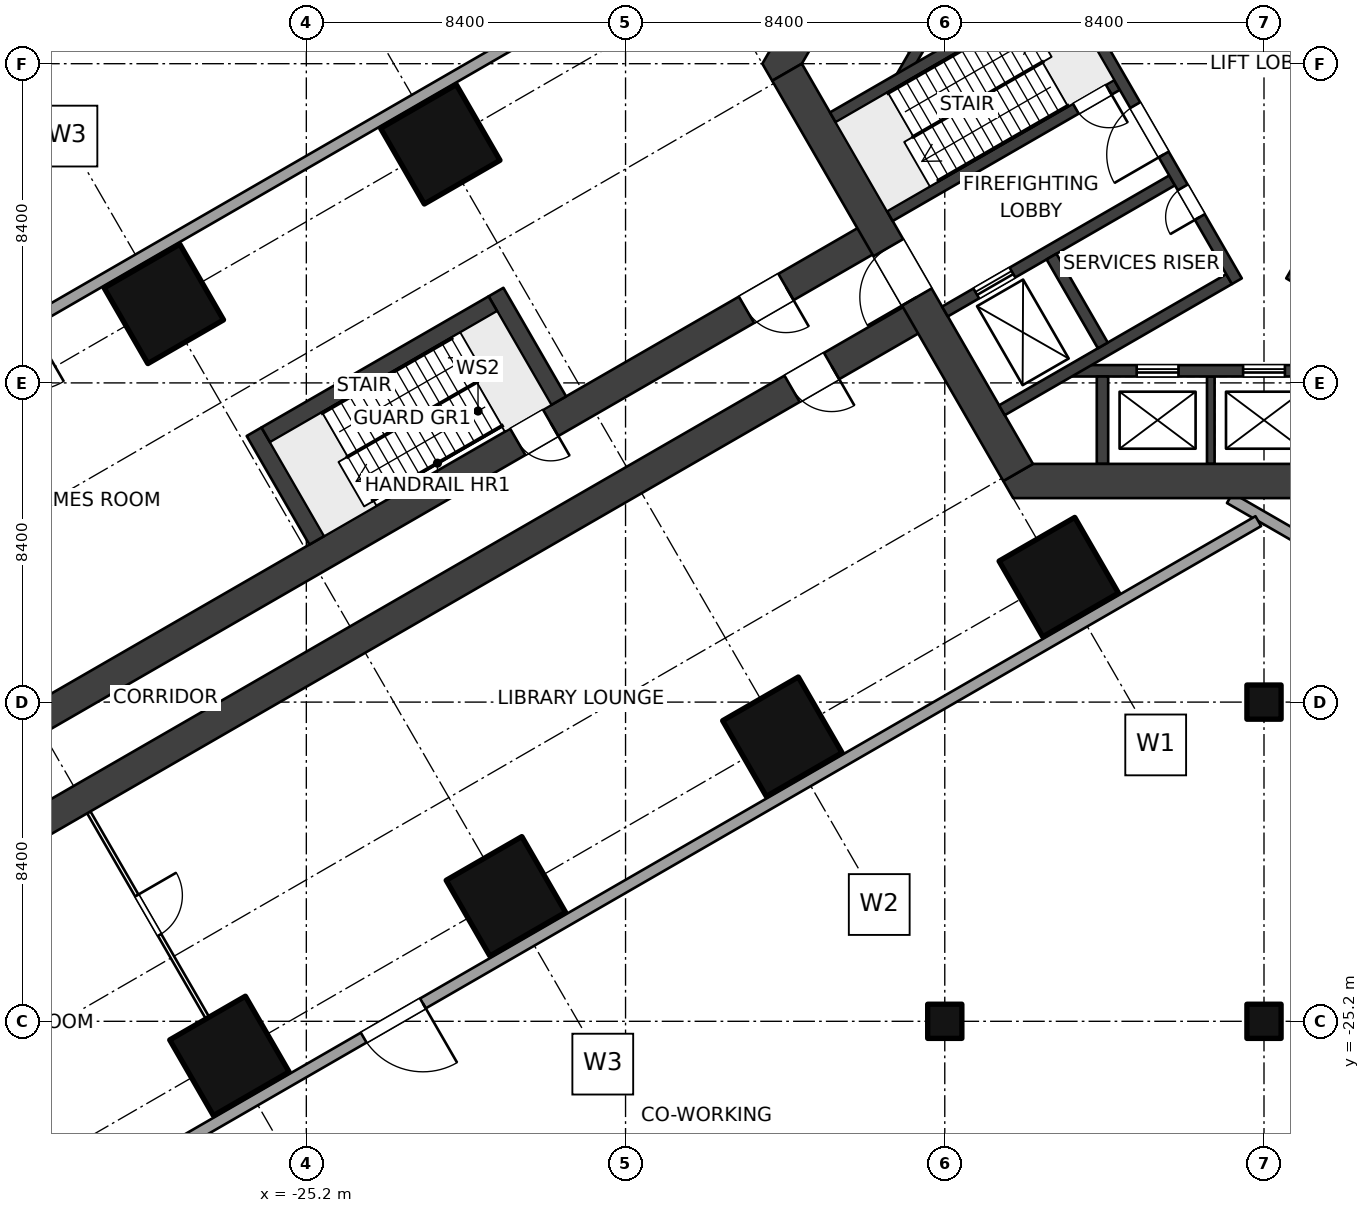
"""IFC4 building model, lengths in metres.
Left out: names, types, materials, properties, quantities, classifications, styles, units other than length and angle.
Written with IfcOpenShell. Run it as: python <this file> out.ifc"""

import sys

from ifc_helpers import new_model, si_unit, direction, frame, frame_2d, origin, origin_2d, place, context, subcontext, project, spatial, polyline, rectangle, outline, extrude, element, fill, save


model = new_model("IFC4")
c1 = context("Model", 3, precision=1e-05, world=origin(), true_north=direction((0.0, 1.0)))
c2 = subcontext(c1, "Body", "Model", "MODEL_VIEW")
j1 = project(units=[si_unit("LENGTHUNIT", "METRE"), si_unit("PLANEANGLEUNIT", "RADIAN")], contexts=[c1])
p1 = place(None, origin())
s1 = spatial("IfcSite", under=j1, at=p1, CompositionType="ELEMENT")
p2 = place(p1, origin())
s2 = spatial("IfcBuilding", under=s1, at=p2, CompositionType="ELEMENT")
p3 = place(p2, frame((0.0, 0.0, 6.0)))
s3 = spatial("IfcBuildingStorey", under=s2, at=p3, CompositionType="ELEMENT", Elevation=6.0)
for number, where, z_axis, x_axis in (
    (1, (-5.4, -13.51, 0.0), (0.0, 0.0, 1.0), (-0.5, 0.866, 0.0)),
    (2, (-12.675, -17.71, 0.0), (0.0, 0.0, 1.0), (-0.5, 0.866, 0.0)),
    (3, (-21.675, -2.122, 0.0), (0.0, 0.0, 1.0), (-0.5, 0.866, 0.0)),
    (4, (-19.949, -21.91, 0.0), (0.0, 0.0, 1.0), (-0.5, 0.866, 0.0)),
    (5, (-28.949, -6.322, 0.0), (0.0, 0.0, 1.0), (-0.5, 0.866, 0.0)),
    (6, (-27.224, -26.11, 0.0), (0.0, 0.0, 1.0), (-0.5, 0.866, 0.0)),
):
    element("IfcColumn", number, at=place(p3, frame(where, z_axis=z_axis, x_axis=x_axis)), inside=s3, PredefinedType="COLUMN", context=c2, shape_type="SweptSolid", body=[
        extrude(rectangle(XDim=2.3, YDim=2.3, at=origin_2d()), origin(), (0.0, 0.0, 1.0), 5.0),
    ])
for number, where, z_axis, x_axis in (
    (7, (-8.4, -25.2, 0.0), (0.0, 0.0, 1.0), (1.0, 0.0, 0.0)),
    (8, (0.0, -25.2, 0.0), (0.0, 0.0, 1.0), (1.0, 0.0, 0.0)),
    (9, (0.0, -16.8, 0.0), (0.0, 0.0, 1.0), (1.0, 0.0, 0.0)),
):
    element("IfcColumn", number, at=place(p3, frame(where, z_axis=z_axis, x_axis=x_axis)), inside=s3, PredefinedType="COLUMN", context=c2, shape_type="SweptSolid", body=[
        extrude(rectangle(XDim=0.9, YDim=0.9, at=origin_2d()), origin(), (0.0, 0.0, 1.0), 5.0),
    ])
p4 = place(p3, frame((-6.47, -10.757, 0.0), z_axis=(0.0, 0.0, 1.0), x_axis=(-0.499997612506, 0.8660267822, 0.0)))
e10 = element("IfcWall", 10, at=p4, inside=s3, PredefinedType="SHEAR", context=c2, shape_type="SweptSolid", body=[
    extrude(rectangle(XDim=12.161, YDim=0.9, at=frame_2d((6.08, 0.0))), origin(), (0.0, 0.0, 1.0), 5.0),
])
p5 = place(p4, frame((5.33, 0.0, 0.0)))
e11 = element("IfcOpeningElement", 11, at=p5, cuts=e10, PredefinedType="OPENING", context=c2, shape_type="SweptSolid", body=[
    extrude(rectangle(XDim=1.5, YDim=2.1, at=frame_2d((0.75, 1.05))), frame((0.0, 0.46, 0.0), z_axis=(0.0, -1.0, 0.0), x_axis=(1.0, 0.0, 0.0)), (0.0, 0.0, 1.0), 0.92),
])
p6 = place(p3, origin())
e12 = element("IfcWall", 12, at=p6, inside=s3, PredefinedType="SHEAR", context=c2, shape_type="SweptSolid", body=[
    extrude(outline(polyline([(-6.6, -11.432), (6.6, -11.432), (6.86, -10.981), (6.08, -10.531), (-6.08, -10.531), (-6.86, -10.981), (-6.6, -11.432)])), origin(), (0.0, 0.0, 1.0), 5.0),
])
p7 = place(p3, origin())
e13 = element("IfcWall", 13, at=p7, inside=s3, PredefinedType="SHEAR", context=c2, shape_type="SweptSolid", body=[
    extrude(outline(polyline([(-6.6, 11.432), (-13.2, 0.0), (-12.94, -0.45), (-12.161, 0.0), (-6.08, 10.531), (-6.08, 11.432), (-6.6, 11.432)])), origin(), (0.0, 0.0, 1.0), 5.0),
])
p8 = place(p3, frame((-0.714, -5.724, 0.0), z_axis=(0.0, 0.0, 1.0), x_axis=(-0.499995050369, 0.866028261437, 0.0)))
e14 = element("IfcWall", 14, at=p8, inside=s3, PredefinedType="SHEAR", context=c2, shape_type="SweptSolid", body=[
    extrude(rectangle(XDim=9.2, YDim=0.3, at=frame_2d((4.6, 0.0))), origin(), (0.0, 0.0, 1.0), 5.0),
])
p9 = place(p8, frame((3.85, 0.0, 0.0)))
e15 = element("IfcOpeningElement", 15, at=p9, cuts=e14, PredefinedType="OPENING", context=c2, shape_type="SweptSolid", body=[
    extrude(rectangle(XDim=1.5, YDim=2.1, at=frame_2d((0.75, 1.05))), frame((0.0, 0.16, 0.0), z_axis=(0.0, -1.0, 0.0), x_axis=(1.0, 0.0, 0.0)), (0.0, 0.0, 1.0), 0.32),
])
p10 = place(p8, frame((1.95, 0.0, 0.0)))
e16 = element("IfcOpeningElement", 16, at=p10, cuts=e14, PredefinedType="OPENING", context=c2, shape_type="SweptSolid", body=[
    extrude(rectangle(XDim=0.9, YDim=2.1, at=frame_2d((0.45, 1.05))), frame((0.0, 0.16, 0.0), z_axis=(0.0, -1.0, 0.0), x_axis=(1.0, 0.0, 0.0)), (0.0, 0.0, 1.0), 0.32),
])
p11 = place(p3, frame((-3.869, -0.559, 0.0), z_axis=(0.0, 0.0, 1.0), x_axis=(-0.86602711848, -0.499997030048, 0.0)))
e17 = element("IfcWall", 17, at=p11, inside=s3, PredefinedType="SHEAR", context=c2, shape_type="SweptSolid", body=[
    extrude(rectangle(XDim=6.901, YDim=0.3, at=frame_2d((3.451, 0.0))), origin(), (0.0, 0.0, 1.0), 5.0),
])
p12 = place(p11, frame((0.25, 0.0, 0.0)))
e18 = element("IfcOpeningElement", 18, at=p12, cuts=e17, PredefinedType="OPENING", context=c2, shape_type="SweptSolid", body=[
    extrude(rectangle(XDim=1.0, YDim=2.1, at=frame_2d((0.5, 1.05))), frame((0.0, 0.16, 0.0), z_axis=(0.0, -1.0, 0.0), x_axis=(1.0, 0.0, 0.0)), (0.0, 0.0, 1.0), 0.32),
])
p13 = place(p3, frame((-5.369, 2.039, 0.0), z_axis=(0.0, 0.0, 1.0), x_axis=(-0.86602711848, -0.499997030048, 0.0)))
e19 = element("IfcWall", 19, at=p13, inside=s3, PredefinedType="SHEAR", context=c2, shape_type="SweptSolid", body=[
    extrude(rectangle(XDim=6.901, YDim=0.3, at=frame_2d((3.451, 0.0))), origin(), (0.0, 0.0, 1.0), 5.0),
])
p14 = place(p3, frame((-2.419, -3.071, 0.0), z_axis=(0.0, 0.0, 1.0), x_axis=(-0.86602711848, -0.499997030048, 0.0)))
e20 = element("IfcWall", 20, at=p14, inside=s3, PredefinedType="SHEAR", context=c2, shape_type="SweptSolid", body=[
    extrude(rectangle(XDim=6.901, YDim=0.3, at=frame_2d((3.451, 0.0))), origin(), (0.0, 0.0, 1.0), 5.0),
])
p15 = place(p14, frame((4.85, 0.0, 0.0)))
e21 = element("IfcOpeningElement", 21, at=p15, cuts=e20, PredefinedType="OPENING", context=c2, shape_type="SweptSolid", body=[
    extrude(rectangle(XDim=1.1, YDim=2.1, at=frame_2d((0.55, 1.05))), frame((0.0, 0.16, 0.0), z_axis=(0.0, -1.0, 0.0), x_axis=(1.0, 0.0, 0.0)), (0.0, 0.0, 1.0), 0.32),
])
p16 = place(p3, frame((-0.919, -5.669, 0.0), z_axis=(0.0, 0.0, 1.0), x_axis=(-0.866011800373, -0.500023561059, 0.0)))
e22 = element("IfcWall", 22, at=p16, inside=s3, PredefinedType="SHEAR", context=c2, shape_type="SweptSolid", body=[
    extrude(rectangle(XDim=6.902, YDim=0.3, at=frame_2d((3.451, 0.0))), origin(), (0.0, 0.0, 1.0), 5.0),
])
p17 = place(p3, frame((-4.241, -7.414, 0.0), z_axis=(0.0, 0.0, 1.0), x_axis=(-0.500048589285, 0.86599734893, 0.0)))
e23 = element("IfcWall", 23, at=p17, inside=s3, PredefinedType="SHEAR", context=c2, shape_type="SweptSolid", body=[
    extrude(rectangle(XDim=2.7, YDim=0.3, at=frame_2d((1.35, 0.0))), origin(), (0.0, 0.0, 1.0), 5.0),
])
p18 = place(p3, frame((5.314, 2.244, 0.0), z_axis=(0.0, 0.0, 1.0), x_axis=(-0.499995050369, -0.866028261437, 0.0)))
e24 = element("IfcWall", 24, at=p18, inside=s3, PredefinedType="SHEAR", context=c2, shape_type="SweptSolid", body=[
    extrude(rectangle(XDim=9.2, YDim=0.3, at=frame_2d((4.6, 0.0))), origin(), (0.0, 0.0, 1.0), 5.0),
])
p19 = place(p18, frame((3.85, 0.0, 0.0)))
e25 = element("IfcOpeningElement", 25, at=p19, cuts=e24, PredefinedType="OPENING", context=c2, shape_type="SweptSolid", body=[
    extrude(rectangle(XDim=1.5, YDim=2.1, at=frame_2d((0.75, 1.05))), frame((0.0, 0.16, 0.0), z_axis=(0.0, -1.0, 0.0), x_axis=(1.0, 0.0, 0.0)), (0.0, 0.0, 1.0), 0.32),
])
p20 = place(p18, frame((1.95, 0.0, 0.0)))
e26 = element("IfcOpeningElement", 26, at=p20, cuts=e24, PredefinedType="OPENING", context=c2, shape_type="SweptSolid", body=[
    extrude(rectangle(XDim=0.9, YDim=2.1, at=frame_2d((0.45, 1.05))), frame((0.0, 0.16, 0.0), z_axis=(0.0, -1.0, 0.0), x_axis=(1.0, 0.0, 0.0)), (0.0, 0.0, 1.0), 0.32),
])
p21 = place(p3, frame((5.098, -8.082, 0.0), z_axis=(0.0, 0.0, 1.0), x_axis=(-1.0, 0.0, 0.0)))
e27 = element("IfcWall", 27, at=p21, inside=s3, PredefinedType="SHEAR", context=c2, shape_type="SweptSolid", body=[
    extrude(rectangle(XDim=10.195, YDim=0.3, at=frame_2d((5.098, 0.0))), origin(), (0.0, 0.0, 1.0), 5.0),
])
p22 = place(p21, frame((1.748, 0.0, 0.0)))
e28 = element("IfcOpeningElement", 28, at=p22, cuts=e27, PredefinedType="OPENING", context=c2, shape_type="SweptSolid", body=[
    extrude(rectangle(XDim=1.1, YDim=2.1, at=frame_2d((0.55, 1.05))), frame((0.0, 0.16, 0.0), z_axis=(0.0, -1.0, 0.0), x_axis=(1.0, 0.0, 0.0)), (0.0, 0.0, 1.0), 0.32),
])
p23 = place(p21, frame((4.548, 0.0, 0.0)))
e29 = element("IfcOpeningElement", 29, at=p23, cuts=e27, PredefinedType="OPENING", context=c2, shape_type="SweptSolid", body=[
    extrude(rectangle(XDim=1.1, YDim=2.1, at=frame_2d((0.55, 1.05))), frame((0.0, 0.16, 0.0), z_axis=(0.0, -1.0, 0.0), x_axis=(1.0, 0.0, 0.0)), (0.0, 0.0, 1.0), 0.32),
])
p24 = place(p21, frame((7.348, 0.0, 0.0)))
e30 = element("IfcOpeningElement", 30, at=p24, cuts=e27, PredefinedType="OPENING", context=c2, shape_type="SweptSolid", body=[
    extrude(rectangle(XDim=1.1, YDim=2.1, at=frame_2d((0.55, 1.05))), frame((0.0, 0.16, 0.0), z_axis=(0.0, -1.0, 0.0), x_axis=(1.0, 0.0, 0.0)), (0.0, 0.0, 1.0), 0.32),
])
p25 = place(p3, frame((-4.25, -8.231, 0.0), z_axis=(0.0, 0.0, 1.0), x_axis=(0.0, -1.0, 0.0)))
e31 = element("IfcWall", 31, at=p25, inside=s3, PredefinedType="SHEAR", context=c2, shape_type="SweptSolid", body=[
    extrude(rectangle(XDim=2.3, YDim=0.3, at=frame_2d((1.15, 0.0))), origin(), (0.0, 0.0, 1.0), 5.0),
])
p26 = place(p3, frame((-1.4, -8.231, 0.0), z_axis=(0.0, 0.0, 1.0), x_axis=(0.0, -1.0, 0.0)))
e32 = element("IfcWall", 32, at=p26, inside=s3, PredefinedType="SHEAR", context=c2, shape_type="SweptSolid", body=[
    extrude(rectangle(XDim=2.3, YDim=0.2, at=frame_2d((1.15, 0.0))), origin(), (0.0, 0.0, 1.0), 5.0),
])
p27 = place(p3, frame((-9.548, -0.374, 0.0), z_axis=(0.0, 0.0, 1.0), x_axis=(0.500002290144, 0.866024081565, 0.0)))
e33 = element("IfcWall", 33, at=p27, inside=s3, PredefinedType="SHEAR", context=c2, shape_type="SweptSolid", body=[
    extrude(rectangle(XDim=10.195, YDim=0.3, at=frame_2d((5.098, 0.0))), origin(), (0.0, 0.0, 1.0), 5.0),
])
p28 = place(p3, frame((-9.254, 0.435, 0.0), z_axis=(0.0, 0.0, 1.0), x_axis=(-0.866007057882, 0.500031774688, 0.0)))
e34 = element("IfcWall", 34, at=p28, inside=s3, PredefinedType="SHEAR", context=c2, shape_type="SweptSolid", body=[
    extrude(rectangle(XDim=2.3, YDim=0.3, at=frame_2d((1.15, 0.0))), origin(), (0.0, 0.0, 1.0), 5.0),
])
p29 = place(p3, frame((-8.91, -6.53, 0.0), z_axis=(0.0, 0.0, 1.0), x_axis=(-0.866025284237, -0.500000207062, 0.0)))
e35 = element("IfcWall", 35, at=p29, inside=s3, PredefinedType="SHEAR", context=c2, shape_type="SweptSolid", body=[
    extrude(rectangle(XDim=36.75, YDim=0.8, at=frame_2d((18.375, 0.0))), origin(), (0.0, 0.0, 1.0), 5.0),
])
p30 = place(p29, frame((2.85, 0.0, 0.0)))
e36 = element("IfcOpeningElement", 36, at=p30, cuts=e35, PredefinedType="OPENING", context=c2, shape_type="SweptSolid", body=[
    extrude(rectangle(XDim=1.2, YDim=2.1, at=frame_2d((0.6, 1.05))), frame((0.0, 0.41, 0.0), z_axis=(0.0, -1.0, 0.0), x_axis=(1.0, 0.0, 0.0)), (0.0, 0.0, 1.0), 0.82),
])
p31 = place(p3, frame((-10.11, -4.451, 0.0), z_axis=(0.0, 0.0, 1.0), x_axis=(-0.866025284237, -0.500000207062, 0.0)))
e37 = element("IfcWall", 37, at=p31, inside=s3, PredefinedType="SHEAR", context=c2, shape_type="SweptSolid", body=[
    extrude(rectangle(XDim=36.75, YDim=0.8, at=frame_2d((18.375, 0.0))), origin(), (0.0, 0.0, 1.0), 5.0),
])
p32 = place(p31, frame((10.0, 0.0, 0.0)))
e38 = element("IfcOpeningElement", 38, at=p32, cuts=e37, PredefinedType="OPENING", context=c2, shape_type="SweptSolid", body=[
    extrude(rectangle(XDim=1.0, YDim=2.1, at=frame_2d((0.5, 1.05))), frame((0.0, 0.41, 0.0), z_axis=(0.0, -1.0, 0.0), x_axis=(1.0, 0.0, 0.0)), (0.0, 0.0, 1.0), 0.82),
])
p33 = place(p31, frame((2.85, 0.0, 0.0)))
e39 = element("IfcOpeningElement", 39, at=p33, cuts=e37, PredefinedType="OPENING", context=c2, shape_type="SweptSolid", body=[
    extrude(rectangle(XDim=1.2, YDim=2.1, at=frame_2d((0.6, 1.05))), frame((0.0, 0.41, 0.0), z_axis=(0.0, -1.0, 0.0), x_axis=(1.0, 0.0, 0.0)), (0.0, 0.0, 1.0), 0.82),
])
p34 = place(p3, frame((-30.924, -19.701, 0.0), z_axis=(0.0, 0.0, 1.0), x_axis=(0.500004234368, -0.866022959057, 0.0)))
e40 = element("IfcWall", 40, at=p34, inside=s3, PredefinedType="PARTITIONING", context=c2, shape_type="SweptSolid", body=[
    extrude(rectangle(XDim=6.25, YDim=0.1, at=frame_2d((3.125, 0.0))), origin(), (0.0, 0.0, 1.0), 2.9),
])
p35 = place(p34, frame((2.525, 0.0, 0.0)))
e41 = element("IfcOpeningElement", 41, at=p35, cuts=e40, PredefinedType="OPENING", context=c2, shape_type="SweptSolid", body=[
    extrude(rectangle(XDim=1.2, YDim=2.1, at=frame_2d((0.6, 1.05))), frame((0.0, 0.06, 0.0), z_axis=(0.0, -1.0, 0.0), x_axis=(1.0, 0.0, 0.0)), (0.0, 0.0, 1.0), 0.12),
])
p36 = place(p3, frame((-0.15, -12.038, 0.0), z_axis=(0.0, 0.0, 1.0), x_axis=(-0.866026292622, -0.499998460486, 0.0)))
e42 = element("IfcWall", 42, at=p36, inside=s3, PredefinedType="SOLIDWALL", context=c2, shape_type="SweptSolid", body=[
    extrude(rectangle(XDim=41.883, YDim=0.3, at=frame_2d((20.941, 0.0))), origin(), (0.0, 0.0, 1.0), 4.7),
])
p37 = place(p36, frame((25.383, 0.0, 0.0)))
e43 = element("IfcOpeningElement", 43, at=p37, cuts=e42, PredefinedType="OPENING", context=c2, shape_type="SweptSolid", body=[
    extrude(rectangle(XDim=1.8, YDim=2.4, at=frame_2d((0.9, 1.2))), frame((0.0, 0.16, 0.0), z_axis=(0.0, -1.0, 0.0), x_axis=(1.0, 0.0, 0.0)), (0.0, 0.0, 1.0), 0.32),
])
p38 = place(p3, frame((-9.45, 6.495, 0.0), z_axis=(0.0, 0.0, 1.0), x_axis=(-0.866025301493, -0.500000177174, 0.0)))
e44 = element("IfcWall", 44, at=p38, inside=s3, PredefinedType="SOLIDWALL", context=c2, shape_type="SweptSolid", body=[
    extrude(rectangle(XDim=43.095, YDim=0.3, at=frame_2d((21.548, 0.0))), origin(), (0.0, 0.0, 1.0), 4.7),
])
p39 = place(p38, frame((26.595, 0.0, 0.0)))
e45 = element("IfcOpeningElement", 45, at=p39, cuts=e44, PredefinedType="OPENING", context=c2, shape_type="SweptSolid", body=[
    extrude(rectangle(XDim=1.8, YDim=2.4, at=frame_2d((0.9, 1.2))), frame((0.0, 0.16, 0.0), z_axis=(0.0, -1.0, 0.0), x_axis=(1.0, 0.0, 0.0)), (0.0, 0.0, 1.0), 0.32),
])
p40 = place(p3, frame((-0.9, -11.432, 0.0), z_axis=(0.0, 0.0, 1.0), x_axis=(0.866025301493, -0.500000177174, 0.0)))
e46 = element("IfcWall", 46, at=p40, inside=s3, PredefinedType="SOLIDWALL", context=c2, shape_type="SweptSolid", body=[
    extrude(rectangle(XDim=43.095, YDim=0.3, at=frame_2d((21.548, 0.0))), origin(), (0.0, 0.0, 1.0), 4.7),
])
p41 = place(p40, frame((26.595, 0.0, 0.0)))
e47 = element("IfcOpeningElement", 47, at=p41, cuts=e46, PredefinedType="OPENING", context=c2, shape_type="SweptSolid", body=[
    extrude(rectangle(XDim=1.8, YDim=2.4, at=frame_2d((0.9, 1.2))), frame((0.0, 0.16, 0.0), z_axis=(0.0, -1.0, 0.0), x_axis=(1.0, 0.0, 0.0)), (0.0, 0.0, 1.0), 0.32),
])
for number, where, z_axis, x_axis in (
    (48, (-18.559, -8.868, 0.0), (0.0, 0.0, 1.0), (-0.5, 0.866, 0.0)),
    (49, (-24.925, -12.543, 0.0), (0.0, 0.0, 1.0), (-0.5, 0.866, 0.0)),
):
    element("IfcWall", number, at=place(p3, frame(where, z_axis=z_axis, x_axis=x_axis)), inside=s3, PredefinedType="SOLIDWALL", context=c2, shape_type="SweptSolid", body=[
        extrude(rectangle(XDim=3.3, YDim=0.45, at=frame_2d((1.65, 0.0))), origin(), (0.0, 0.0, 1.0), 5.0),
    ])
p42 = place(p3, frame((-20.292, -6.317, 0.0), z_axis=(0.0, 0.0, 1.0), x_axis=(-0.866028853923, -0.499994024137, 0.0)))
e50 = element("IfcWall", 50, at=p42, inside=s3, PredefinedType="SOLIDWALL", context=c2, shape_type="SweptSolid", body=[
    extrude(rectangle(XDim=6.9, YDim=0.45, at=frame_2d((3.45, 0.0))), origin(), (0.0, 0.0, 1.0), 5.0),
])
p43 = place(p23, origin())
e51 = element("IfcDoor", 51, at=p43, inside=s3, OperationType="DOUBLE_DOOR_SLIDING", PredefinedType="DOOR", context=c2, shape_type="SweptSolid", body=[
    extrude(rectangle(XDim=1.1, YDim=2.1, at=frame_2d((0.55, 1.05))), frame((0.0, 0.025, 0.0), z_axis=(0.0, -1.0, 0.0), x_axis=(1.0, 0.0, 0.0)), (0.0, 0.0, 1.0), 0.05),
])
fill(e29, e51)
p44 = place(p24, origin())
e52 = element("IfcDoor", 52, at=p44, inside=s3, OperationType="DOUBLE_DOOR_SLIDING", PredefinedType="DOOR", context=c2, shape_type="SweptSolid", body=[
    extrude(rectangle(XDim=1.1, YDim=2.1, at=frame_2d((0.55, 1.05))), frame((0.0, 0.025, 0.0), z_axis=(0.0, -1.0, 0.0), x_axis=(1.0, 0.0, 0.0)), (0.0, 0.0, 1.0), 0.05),
])
fill(e30, e52)
p45 = place(p15, origin())
e53 = element("IfcDoor", 53, at=p45, inside=s3, OperationType="DOUBLE_DOOR_SLIDING", PredefinedType="DOOR", context=c2, shape_type="SweptSolid", body=[
    extrude(rectangle(XDim=1.1, YDim=2.1, at=frame_2d((0.55, 1.05))), frame((0.0, 0.025, 0.0), z_axis=(0.0, -1.0, 0.0), x_axis=(1.0, 0.0, 0.0)), (0.0, 0.0, 1.0), 0.05),
])
fill(e21, e53)
p46 = place(p9, origin())
e54 = element("IfcDoor", 54, at=p46, inside=s3, OperationType="DOUBLE_DOOR_DOUBLE_SWING", PredefinedType="DOOR", context=c2, shape_type="SweptSolid", body=[
    extrude(rectangle(XDim=1.5, YDim=2.1, at=frame_2d((0.75, 1.05))), frame((0.0, 0.025, 0.0), z_axis=(0.0, -1.0, 0.0), x_axis=(1.0, 0.0, 0.0)), (0.0, 0.0, 1.0), 0.05),
])
fill(e15, e54)
p47 = place(p10, origin())
e55 = element("IfcDoor", 55, at=p47, inside=s3, OperationType="SINGLE_SWING_LEFT", PredefinedType="DOOR", context=c2, shape_type="SweptSolid", body=[
    extrude(rectangle(XDim=0.9, YDim=2.1, at=frame_2d((0.45, 1.05))), frame((0.0, 0.025, 0.0), z_axis=(0.0, -1.0, 0.0), x_axis=(1.0, 0.0, 0.0)), (0.0, 0.0, 1.0), 0.05),
])
fill(e16, e55)
p48 = place(p12, origin())
e56 = element("IfcDoor", 56, at=p48, inside=s3, OperationType="SINGLE_SWING_LEFT", PredefinedType="DOOR", context=c2, shape_type="SweptSolid", body=[
    extrude(rectangle(XDim=1.0, YDim=2.1, at=frame_2d((0.5, 1.05))), frame((0.0, 0.025, 0.0), z_axis=(0.0, -1.0, 0.0), x_axis=(1.0, 0.0, 0.0)), (0.0, 0.0, 1.0), 0.05),
])
fill(e18, e56)
p49 = place(p5, origin())
e57 = element("IfcDoor", 57, at=p49, inside=s3, OperationType="DOUBLE_DOOR_DOUBLE_SWING", PredefinedType="DOOR", context=c2, shape_type="SweptSolid", body=[
    extrude(rectangle(XDim=1.5, YDim=2.1, at=frame_2d((0.75, 1.05))), frame((0.0, 0.025, 0.0), z_axis=(0.0, -1.0, 0.0), x_axis=(1.0, 0.0, 0.0)), (0.0, 0.0, 1.0), 0.05),
])
fill(e11, e57)
p50 = place(p32, origin())
e58 = element("IfcDoor", 58, at=p50, inside=s3, OperationType="SINGLE_SWING_LEFT", PredefinedType="DOOR", context=c2, shape_type="SweptSolid", body=[
    extrude(rectangle(XDim=1.0, YDim=2.1, at=frame_2d((0.5, 1.05))), frame((0.0, 0.025, 0.0), z_axis=(0.0, -1.0, 0.0), x_axis=(1.0, 0.0, 0.0)), (0.0, 0.0, 1.0), 0.05),
])
fill(e38, e58)
p51 = place(p35, origin())
e59 = element("IfcDoor", 59, at=p51, inside=s3, OperationType="DOUBLE_SWING_LEFT", PredefinedType="DOOR", context=c2, shape_type="SweptSolid", body=[
    extrude(rectangle(XDim=1.2, YDim=2.1, at=frame_2d((0.6, 1.05))), frame((0.0, 0.025, 0.0), z_axis=(0.0, -1.0, 0.0), x_axis=(1.0, 0.0, 0.0)), (0.0, 0.0, 1.0), 0.05),
])
fill(e41, e59)
p52 = place(p30, origin())
e60 = element("IfcDoor", 60, at=p52, inside=s3, OperationType="DOUBLE_SWING_LEFT", PredefinedType="DOOR", context=c2, shape_type="SweptSolid", body=[
    extrude(rectangle(XDim=1.2, YDim=2.1, at=frame_2d((0.6, 1.05))), frame((0.0, 0.025, 0.0), z_axis=(0.0, -1.0, 0.0), x_axis=(1.0, 0.0, 0.0)), (0.0, 0.0, 1.0), 0.05),
])
fill(e36, e60)
p53 = place(p33, origin())
e61 = element("IfcDoor", 61, at=p53, inside=s3, OperationType="DOUBLE_SWING_LEFT", PredefinedType="DOOR", context=c2, shape_type="SweptSolid", body=[
    extrude(rectangle(XDim=1.2, YDim=2.1, at=frame_2d((0.6, 1.05))), frame((0.0, 0.025, 0.0), z_axis=(0.0, -1.0, 0.0), x_axis=(1.0, 0.0, 0.0)), (0.0, 0.0, 1.0), 0.05),
])
fill(e39, e61)
p54 = place(p37, origin())
e62 = element("IfcDoor", 62, at=p54, inside=s3, OperationType="DOUBLE_DOOR_DOUBLE_SWING", PredefinedType="DOOR", context=c2, shape_type="SweptSolid", body=[
    extrude(rectangle(XDim=1.8, YDim=2.4, at=frame_2d((0.9, 1.2))), frame((0.0, 0.025, 0.0), z_axis=(0.0, -1.0, 0.0), x_axis=(1.0, 0.0, 0.0)), (0.0, 0.0, 1.0), 0.05),
])
fill(e43, e62)
save(model, sys.argv[1])
